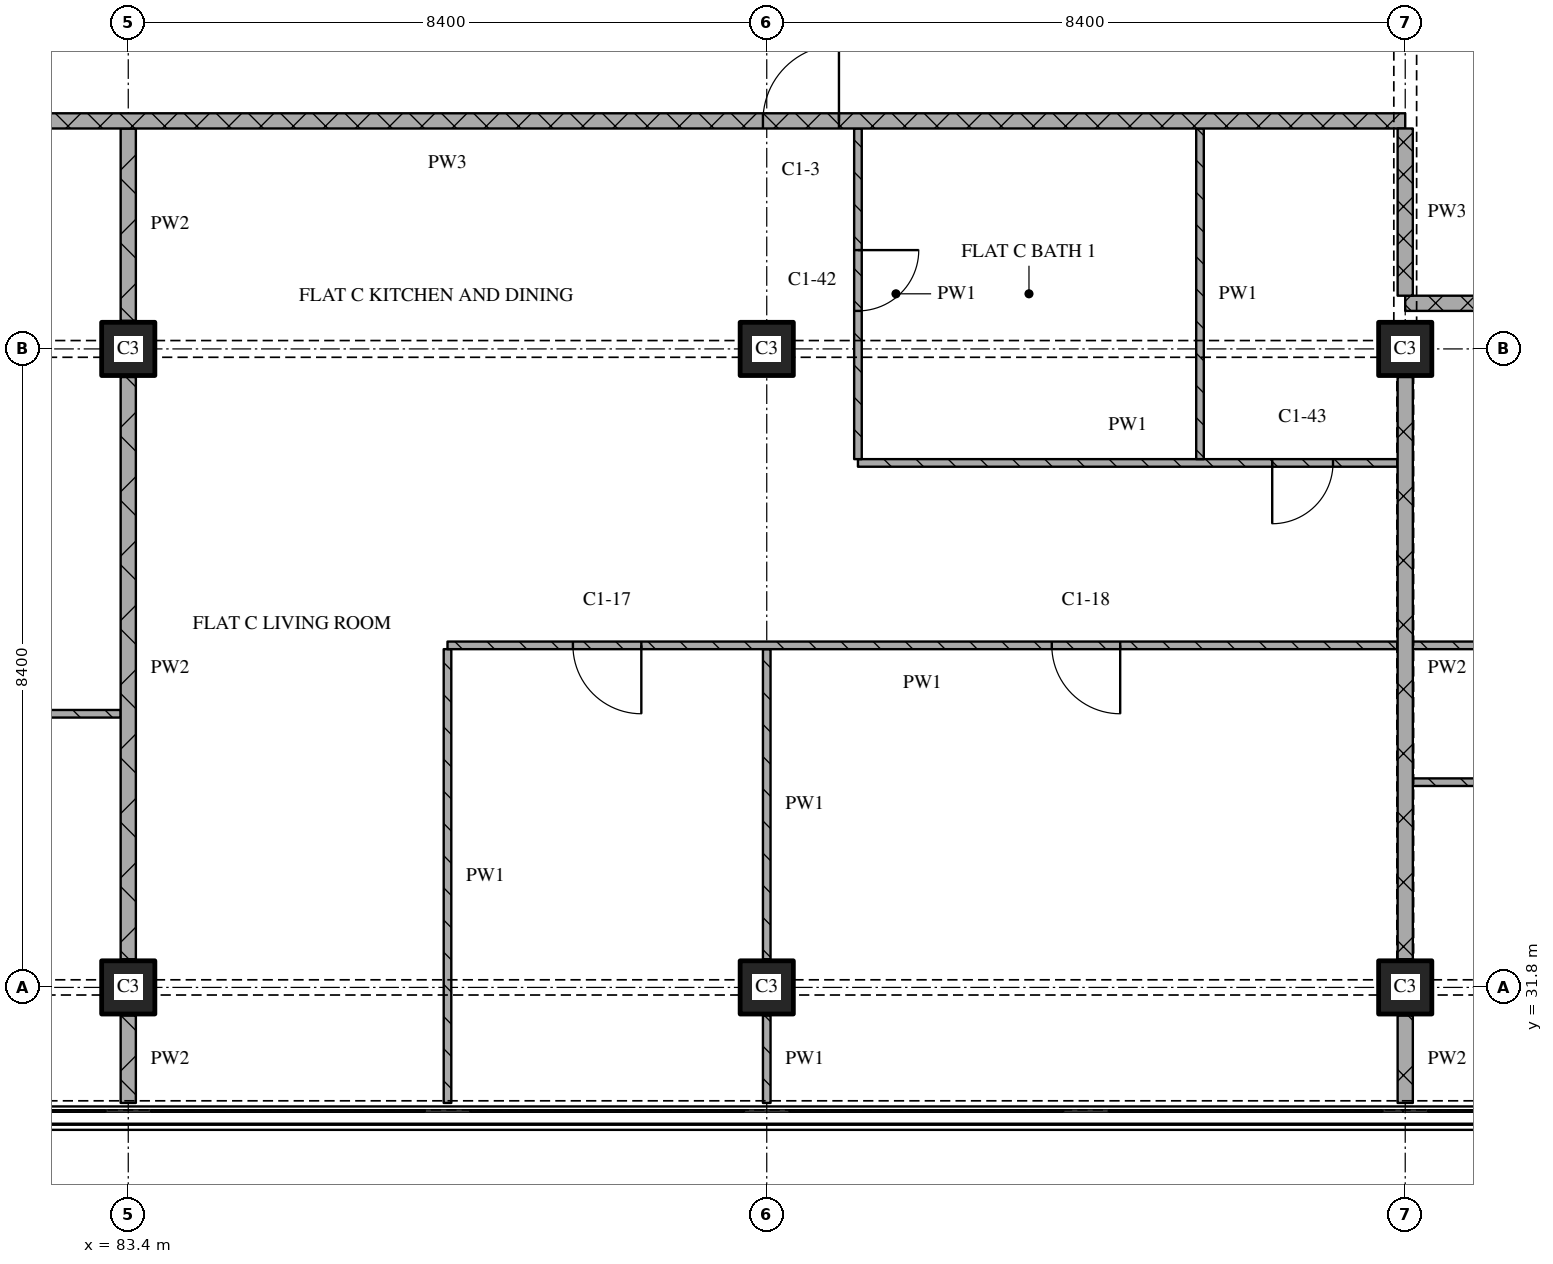
"""IFC4 building model, lengths in metres.
Left out: names, types, materials, properties, quantities, classifications, styles, units other than length and angle.
Written with IfcOpenShell. Run it as: python <this file> out.ifc"""

import sys

from ifc_helpers import new_model, si_unit, direction, frame, frame_2d, origin, origin_2d, place, context, subcontext, project, spatial, rectangle, extrude, element, fill, save


model = new_model("IFC4")
c1 = context("Model", 3, precision=1e-05, world=origin(), true_north=direction((0.0, 1.0)))
c2 = subcontext(c1, "Body", "Model", "MODEL_VIEW")
j1 = project(units=[si_unit("LENGTHUNIT", "METRE"), si_unit("PLANEANGLEUNIT", "RADIAN")], contexts=[c1])
p1 = place(None, origin())
s1 = spatial("IfcSite", under=j1, at=p1, CompositionType="ELEMENT")
p2 = place(p1, origin())
s2 = spatial("IfcBuilding", under=s1, at=p2, CompositionType="ELEMENT")
p3 = place(p2, frame((0.0, 0.0, 151.05)))
s3 = spatial("IfcBuildingStorey", under=s2, at=p3, CompositionType="ELEMENT", Elevation=151.05)
for number, where, z_axis, x_axis in (
    (1, (83.4, 31.8, 0.0), (0.0, 0.0, 1.0), (1.0, 0.0, 0.0)),
    (2, (83.4, 40.2, 0.0), (0.0, 0.0, 1.0), (1.0, 0.0, 0.0)),
    (3, (91.8, 31.8, 0.0), (0.0, 0.0, 1.0), (1.0, 0.0, 0.0)),
    (4, (91.8, 40.2, 0.0), (0.0, 0.0, 1.0), (1.0, 0.0, 0.0)),
    (5, (100.2, 31.8, 0.0), (0.0, 0.0, 1.0), (1.0, 0.0, 0.0)),
    (6, (100.2, 40.2, 0.0), (0.0, 0.0, 1.0), (1.0, 0.0, 0.0)),
):
    element("IfcColumn", number, at=place(p3, frame(where, z_axis=z_axis, x_axis=x_axis)), inside=s3, PredefinedType="COLUMN", context=c2, shape_type="SweptSolid", body=[
        extrude(rectangle(XDim=0.7, YDim=0.7, at=origin_2d()), origin(), (0.0, 0.0, 1.0), 3.6),
    ])
p4 = place(p3, frame((117.0, 34.5, 0.0), z_axis=(0.0, 0.0, 1.0), x_axis=(-1.0, 0.0, 0.0)))
e7 = element("IfcWall", 7, at=p4, inside=s3, PredefinedType="PARTITIONING", context=c2, shape_type="SweptSolid", body=[
    extrude(rectangle(XDim=16.7, YDim=0.1, at=frame_2d((8.35, 0.0))), origin(), (0.0, 0.0, 1.0), 3.32),
])
p5 = place(p4, frame((7.95, 0.0, 0.0)))
e8 = element("IfcOpeningElement", 8, at=p5, cuts=e7, PredefinedType="OPENING", context=c2, shape_type="SweptSolid", body=[
    extrude(rectangle(XDim=0.9, YDim=2.1, at=frame_2d((0.45, 1.05))), frame((0.0, 0.06, 0.0), z_axis=(0.0, -1.0, 0.0), x_axis=(1.0, 0.0, 0.0)), (0.0, 0.0, 1.0), 0.12),
])
p6 = place(p4, frame((14.25, 0.0, 0.0)))
e9 = element("IfcOpeningElement", 9, at=p6, cuts=e7, PredefinedType="OPENING", context=c2, shape_type="SweptSolid", body=[
    extrude(rectangle(XDim=0.9, YDim=2.1, at=frame_2d((0.45, 1.05))), frame((0.0, 0.06, 0.0), z_axis=(0.0, -1.0, 0.0), x_axis=(1.0, 0.0, 0.0)), (0.0, 0.0, 1.0), 0.12),
])
p7 = place(p3, frame((83.3, 35.4, 0.0), z_axis=(0.0, 0.0, 1.0), x_axis=(-1.0, 0.0, 0.0)))
e10 = element("IfcWall", 10, at=p7, inside=s3, PredefinedType="PARTITIONING", context=c2, shape_type="SweptSolid", body=[
    extrude(rectangle(XDim=4.1, YDim=0.1, at=frame_2d((2.05, 0.0))), origin(), (0.0, 0.0, 1.0), 3.32),
])
p8 = place(p7, frame((1.55, 0.0, 0.0)))
e11 = element("IfcOpeningElement", 11, at=p8, cuts=e10, PredefinedType="OPENING", context=c2, shape_type="SweptSolid", body=[
    extrude(rectangle(XDim=0.9, YDim=2.1, at=frame_2d((0.45, 1.05))), frame((0.0, 0.06, 0.0), z_axis=(0.0, -1.0, 0.0), x_axis=(1.0, 0.0, 0.0)), (0.0, 0.0, 1.0), 0.12),
])
p9 = place(p3, frame((93.0, 38.7, 0.0), z_axis=(0.0, 0.0, 1.0), x_axis=(1.0, 0.0, 0.0)))
e12 = element("IfcWall", 12, at=p9, inside=s3, PredefinedType="PARTITIONING", context=c2, shape_type="SweptSolid", body=[
    extrude(rectangle(XDim=7.1, YDim=0.1, at=frame_2d((3.55, 0.0))), origin(), (0.0, 0.0, 1.0), 3.32),
])
p10 = place(p9, frame((5.45, 0.0, 0.0)))
e13 = element("IfcOpeningElement", 13, at=p10, cuts=e12, PredefinedType="OPENING", context=c2, shape_type="SweptSolid", body=[
    extrude(rectangle(XDim=0.8, YDim=2.1, at=frame_2d((0.4, 1.05))), frame((0.0, 0.06, 0.0), z_axis=(0.0, -1.0, 0.0), x_axis=(1.0, 0.0, 0.0)), (0.0, 0.0, 1.0), 0.12),
])
p11 = place(p3, frame((124.48, 40.8, 0.0), z_axis=(0.0, 0.0, 1.0), x_axis=(-1.0, 0.0, 0.0)))
e14 = element("IfcWall", 14, at=p11, inside=s3, PredefinedType="PARTITIONING", context=c2, shape_type="SweptSolid", body=[
    extrude(rectangle(XDim=24.28, YDim=0.2, at=frame_2d((12.14, 0.0))), origin(), (0.0, 0.0, 1.0), 3.32),
])
p12 = place(p11, frame((10.73, 0.0, 0.0)))
e15 = element("IfcOpeningElement", 15, at=p12, cuts=e14, PredefinedType="OPENING", context=c2, shape_type="SweptSolid", body=[
    extrude(rectangle(XDim=1.0, YDim=2.1, at=frame_2d((0.5, 1.05))), frame((0.0, 0.11, 0.0), z_axis=(0.0, -1.0, 0.0), x_axis=(1.0, 0.0, 0.0)), (0.0, 0.0, 1.0), 0.22),
])
p13 = place(p3, frame((100.2, 43.2, 0.0), z_axis=(0.0, 0.0, 1.0), x_axis=(-1.0, 0.0, 0.0)))
e16 = element("IfcWall", 16, at=p13, inside=s3, PredefinedType="PARTITIONING", context=c2, shape_type="SweptSolid", body=[
    extrude(rectangle(XDim=25.2, YDim=0.2, at=frame_2d((12.6, 0.0))), origin(), (0.0, 0.0, 1.0), 3.32),
])
p14 = place(p13, frame((7.45, 0.0, 0.0)))
e17 = element("IfcOpeningElement", 17, at=p14, cuts=e16, PredefinedType="OPENING", context=c2, shape_type="SweptSolid", body=[
    extrude(rectangle(XDim=1.0, YDim=2.1, at=frame_2d((0.5, 1.05))), frame((0.0, 0.11, 0.0), z_axis=(0.0, -1.0, 0.0), x_axis=(1.0, 0.0, 0.0)), (0.0, 0.0, 1.0), 0.22),
])
p15 = place(p13, frame((20.95, 0.0, 0.0)))
e18 = element("IfcOpeningElement", 18, at=p15, cuts=e16, PredefinedType="OPENING", context=c2, shape_type="SweptSolid", body=[
    extrude(rectangle(XDim=1.0, YDim=2.1, at=frame_2d((0.5, 1.05))), frame((0.0, 0.11, 0.0), z_axis=(0.0, -1.0, 0.0), x_axis=(1.0, 0.0, 0.0)), (0.0, 0.0, 1.0), 0.22),
])
p16 = place(p3, frame((83.4, 31.43, 0.0), z_axis=(0.0, 0.0, 1.0), x_axis=(0.0, -1.0, 0.0)))
e19 = element("IfcWall", 19, at=p16, inside=s3, PredefinedType="PARTITIONING", context=c2, shape_type="SweptSolid", body=[
    extrude(rectangle(XDim=1.15, YDim=0.2, at=frame_2d((0.575, 0.0))), origin(), (0.0, 0.0, 1.0), 3.32),
])
p17 = place(p3, frame((83.4, 39.83, 0.0), z_axis=(0.0, 0.0, 1.0), x_axis=(0.0, -1.0, 0.0)))
e20 = element("IfcWall", 20, at=p17, inside=s3, PredefinedType="PARTITIONING", context=c2, shape_type="SweptSolid", body=[
    extrude(rectangle(XDim=7.66, YDim=0.2, at=frame_2d((3.83, 0.0))), origin(), (0.0, 0.0, 1.0), 3.32),
])
p18 = place(p3, frame((83.4, 43.1, 0.0), z_axis=(0.0, 0.0, 1.0), x_axis=(0.0, -1.0, 0.0)))
e21 = element("IfcWall", 21, at=p18, inside=s3, PredefinedType="PARTITIONING", context=c2, shape_type="SweptSolid", body=[
    extrude(rectangle(XDim=2.53, YDim=0.2, at=frame_2d((1.265, 0.0))), origin(), (0.0, 0.0, 1.0), 3.32),
])
p19 = place(p3, frame((87.6, 36.25, 0.0), z_axis=(0.0, 0.0, 1.0), x_axis=(0.0, -1.0, 0.0)))
e22 = element("IfcWall", 22, at=p19, inside=s3, PredefinedType="PARTITIONING", context=c2, shape_type="SweptSolid", body=[
    extrude(rectangle(XDim=5.97, YDim=0.1, at=frame_2d((2.985, 0.0))), origin(), (0.0, 0.0, 1.0), 3.32),
])
p20 = place(p3, frame((91.8, 31.43, 0.0), z_axis=(0.0, 0.0, 1.0), x_axis=(0.0, -1.0, 0.0)))
e23 = element("IfcWall", 23, at=p20, inside=s3, PredefinedType="PARTITIONING", context=c2, shape_type="SweptSolid", body=[
    extrude(rectangle(XDim=1.15, YDim=0.1, at=frame_2d((0.575, 0.0))), origin(), (0.0, 0.0, 1.0), 3.32),
])
p21 = place(p3, frame((91.8, 36.25, 0.0), z_axis=(0.0, 0.0, 1.0), x_axis=(0.0, -1.0, 0.0)))
e24 = element("IfcWall", 24, at=p21, inside=s3, PredefinedType="PARTITIONING", context=c2, shape_type="SweptSolid", body=[
    extrude(rectangle(XDim=4.08, YDim=0.1, at=frame_2d((2.04, 0.0))), origin(), (0.0, 0.0, 1.0), 3.32),
])
p22 = place(p3, frame((93.0, 43.1, 0.0), z_axis=(0.0, 0.0, 1.0), x_axis=(0.0, -1.0, 0.0)))
e25 = element("IfcWall", 25, at=p22, inside=s3, PredefinedType="PARTITIONING", context=c2, shape_type="SweptSolid", body=[
    extrude(rectangle(XDim=4.35, YDim=0.1, at=frame_2d((2.175, 0.0))), origin(), (0.0, 0.0, 1.0), 3.32),
])
p23 = place(p22, frame((1.6, 0.0, 0.0)))
e26 = element("IfcOpeningElement", 26, at=p23, cuts=e25, PredefinedType="OPENING", context=c2, shape_type="SweptSolid", body=[
    extrude(rectangle(XDim=0.8, YDim=2.1, at=frame_2d((0.4, 1.05))), frame((0.0, 0.06, 0.0), z_axis=(0.0, -1.0, 0.0), x_axis=(1.0, 0.0, 0.0)), (0.0, 0.0, 1.0), 0.12),
])
p24 = place(p3, frame((97.5, 43.1, 0.0), z_axis=(0.0, 0.0, 1.0), x_axis=(0.0, -1.0, 0.0)))
e27 = element("IfcWall", 27, at=p24, inside=s3, PredefinedType="PARTITIONING", context=c2, shape_type="SweptSolid", body=[
    extrude(rectangle(XDim=4.35, YDim=0.1, at=frame_2d((2.175, 0.0))), origin(), (0.0, 0.0, 1.0), 3.32),
])
p25 = place(p3, frame((100.2, 43.1, 0.0), z_axis=(0.0, 0.0, 1.0), x_axis=(0.0, -1.0, 0.0)))
e28 = element("IfcWall", 28, at=p25, inside=s3, PredefinedType="PARTITIONING", context=c2, shape_type="SweptSolid", body=[
    extrude(rectangle(XDim=2.2, YDim=0.2, at=frame_2d((1.1, 0.0))), origin(), (0.0, 0.0, 1.0), 2.43),
])
p26 = place(p3, frame((100.2, 31.43, 0.0), z_axis=(0.0, 0.0, 1.0), x_axis=(0.0, -1.0, 0.0)))
e29 = element("IfcWall", 29, at=p26, inside=s3, PredefinedType="PARTITIONING", context=c2, shape_type="SweptSolid", body=[
    extrude(rectangle(XDim=1.15, YDim=0.2, at=frame_2d((0.575, 0.0))), origin(), (0.0, 0.0, 1.0), 3.32),
])
p27 = place(p3, frame((100.2, 39.83, 0.0), z_axis=(0.0, 0.0, 1.0), x_axis=(0.0, -1.0, 0.0)))
e30 = element("IfcWall", 30, at=p27, inside=s3, PredefinedType="PARTITIONING", context=c2, shape_type="SweptSolid", body=[
    extrude(rectangle(XDim=7.66, YDim=0.2, at=frame_2d((3.83, 0.0))), origin(), (0.0, 0.0, 1.0), 2.72),
])
p28 = place(p3, frame((100.1, 36.3, 0.0), z_axis=(0.0, 0.0, 1.0), x_axis=(-1.0, 0.0, 0.0)))
e31 = element("IfcWall", 31, at=p28, inside=s3, PredefinedType="PARTITIONING", context=c2, shape_type="SweptSolid", body=[
    extrude(rectangle(XDim=12.5, YDim=0.1, at=frame_2d((6.25, 0.0))), origin(), (0.0, 0.0, 1.0), 3.32),
])
p29 = place(p28, frame((3.65, 0.0, 0.0)))
e32 = element("IfcOpeningElement", 32, at=p29, cuts=e31, PredefinedType="OPENING", context=c2, shape_type="SweptSolid", body=[
    extrude(rectangle(XDim=0.9, YDim=2.1, at=frame_2d((0.45, 1.05))), frame((0.0, 0.06, 0.0), z_axis=(0.0, -1.0, 0.0), x_axis=(1.0, 0.0, 0.0)), (0.0, 0.0, 1.0), 0.12),
])
p30 = place(p28, frame((9.95, 0.0, 0.0)))
e33 = element("IfcOpeningElement", 33, at=p30, cuts=e31, PredefinedType="OPENING", context=c2, shape_type="SweptSolid", body=[
    extrude(rectangle(XDim=0.9, YDim=2.1, at=frame_2d((0.45, 1.05))), frame((0.0, 0.06, 0.0), z_axis=(0.0, -1.0, 0.0), x_axis=(1.0, 0.0, 0.0)), (0.0, 0.0, 1.0), 0.12),
])
p31 = place(p3, frame((100.3, 36.3, 0.0), z_axis=(0.0, 0.0, 1.0), x_axis=(1.0, 0.0, 0.0)))
e34 = element("IfcWall", 34, at=p31, inside=s3, PredefinedType="PARTITIONING", context=c2, shape_type="SweptSolid", body=[
    extrude(rectangle(XDim=12.2, YDim=0.1, at=frame_2d((6.1, 0.0))), origin(), (0.0, 0.0, 1.0), 3.32),
])
p32 = place(p31, frame((1.75, 0.0, 0.0)))
e35 = element("IfcOpeningElement", 35, at=p32, cuts=e34, PredefinedType="OPENING", context=c2, shape_type="SweptSolid", body=[
    extrude(rectangle(XDim=0.8, YDim=2.1, at=frame_2d((0.4, 1.05))), frame((0.0, 0.06, 0.0), z_axis=(0.0, -1.0, 0.0), x_axis=(1.0, 0.0, 0.0)), (0.0, 0.0, 1.0), 0.12),
])
p33 = place(p31, frame((6.25, 0.0, 0.0)))
e36 = element("IfcOpeningElement", 36, at=p33, cuts=e34, PredefinedType="OPENING", context=c2, shape_type="SweptSolid", body=[
    extrude(rectangle(XDim=0.8, YDim=2.1, at=frame_2d((0.4, 1.05))), frame((0.0, 0.06, 0.0), z_axis=(0.0, -1.0, 0.0), x_axis=(1.0, 0.0, 0.0)), (0.0, 0.0, 1.0), 0.12),
])
p34 = place(p10, origin())
e37 = element("IfcDoor", 37, at=p34, inside=s3, OperationType="SINGLE_SWING_RIGHT", PredefinedType="DOOR", context=c2, shape_type="SweptSolid", body=[
    extrude(rectangle(XDim=0.8, YDim=2.1, at=frame_2d((0.4, 1.05))), frame((0.0, 0.025, 0.0), z_axis=(0.0, -1.0, 0.0), x_axis=(1.0, 0.0, 0.0)), (0.0, 0.0, 1.0), 0.05),
])
fill(e13, e37)
p35 = place(p14, origin())
e38 = element("IfcDoor", 38, at=p35, inside=s3, OperationType="SINGLE_SWING_RIGHT", PredefinedType="DOOR", context=c2, shape_type="SweptSolid", body=[
    extrude(rectangle(XDim=1.0, YDim=2.1, at=frame_2d((0.5, 1.05))), frame((0.0, 0.025, 0.0), z_axis=(0.0, -1.0, 0.0), x_axis=(1.0, 0.0, 0.0)), (0.0, 0.0, 1.0), 0.05),
])
fill(e17, e38)
p36 = place(p23, origin())
e39 = element("IfcDoor", 39, at=p36, inside=s3, OperationType="SINGLE_SWING_LEFT", PredefinedType="DOOR", context=c2, shape_type="SweptSolid", body=[
    extrude(rectangle(XDim=0.8, YDim=2.1, at=frame_2d((0.4, 1.05))), frame((0.0, 0.025, 0.0), z_axis=(0.0, -1.0, 0.0), x_axis=(1.0, 0.0, 0.0)), (0.0, 0.0, 1.0), 0.05),
])
fill(e26, e39)
p37 = place(p29, origin())
e40 = element("IfcDoor", 40, at=p37, inside=s3, OperationType="SINGLE_SWING_LEFT", PredefinedType="DOOR", context=c2, shape_type="SweptSolid", body=[
    extrude(rectangle(XDim=0.9, YDim=2.1, at=frame_2d((0.45, 1.05))), frame((0.0, 0.025, 0.0), z_axis=(0.0, -1.0, 0.0), x_axis=(1.0, 0.0, 0.0)), (0.0, 0.0, 1.0), 0.05),
])
fill(e32, e40)
p38 = place(p30, origin())
e41 = element("IfcDoor", 41, at=p38, inside=s3, OperationType="SINGLE_SWING_LEFT", PredefinedType="DOOR", context=c2, shape_type="SweptSolid", body=[
    extrude(rectangle(XDim=0.9, YDim=2.1, at=frame_2d((0.45, 1.05))), frame((0.0, 0.025, 0.0), z_axis=(0.0, -1.0, 0.0), x_axis=(1.0, 0.0, 0.0)), (0.0, 0.0, 1.0), 0.05),
])
fill(e33, e41)
save(model, sys.argv[1])
